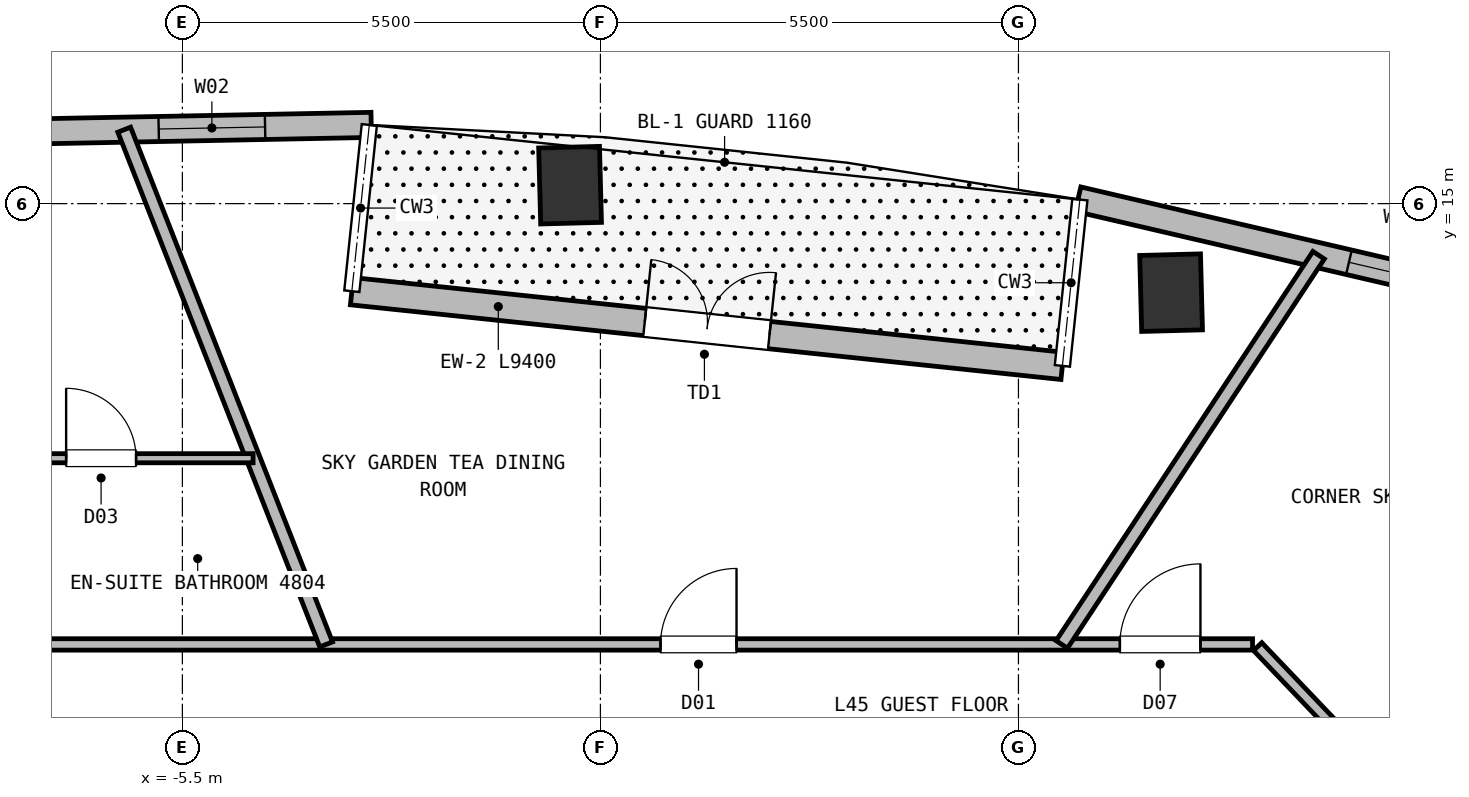
"""IFC4 building model, lengths in metres.
Left out: names, types, materials, properties, quantities, classifications, styles, units other than length and angle.
Written with IfcOpenShell. Run it as: python <this file> out.ifc"""

import sys

from ifc_helpers import new_model, si_unit, direction, frame, frame_2d, origin, origin_2d, place, context, subcontext, project, spatial, rectangle, extrude, element, fill, save


model = new_model("IFC4")
c1 = context("Model", 3, precision=1e-05, world=origin(), true_north=direction((0.0, 1.0)))
c2 = subcontext(c1, "Body", "Model", "MODEL_VIEW")
j1 = project(units=[si_unit("LENGTHUNIT", "METRE"), si_unit("PLANEANGLEUNIT", "RADIAN")], contexts=[c1])
p1 = place(None, origin())
s1 = spatial("IfcSite", under=j1, at=p1, CompositionType="ELEMENT")
p2 = place(p1, origin())
s2 = spatial("IfcBuilding", under=s1, at=p2, CompositionType="ELEMENT")
p3 = place(p2, frame((0.0, 0.0, 182.75)))
s3 = spatial("IfcBuildingStorey", under=s2, at=p3, CompositionType="ELEMENT", Elevation=182.75)
for number, where, z_axis, x_axis in (
    (1, (7.508, 13.828, 0.0), (0.0, 0.0, 1.0), (1.0, 0.026, 0.0)),
    (2, (-0.399, 15.243, 0.0), (0.0, 0.0, 1.0), (1.0, 0.026, 0.0)),
):
    element("IfcColumn", number, at=place(p3, frame(where, z_axis=z_axis, x_axis=x_axis)), inside=s3, PredefinedType="COLUMN", context=c2, shape_type="SweptSolid", body=[
        extrude(rectangle(XDim=0.8, YDim=1.0, at=origin_2d()), origin(), (0.0, 0.0, 1.0), 3.8),
    ])
p4 = place(p3, frame((-3.271, 13.848, 0.0), z_axis=(0.0, 0.0, 1.0), x_axis=(0.994520954065, -0.104537418785, 0.0)))
e3 = element("IfcWall", 3, at=p4, inside=s3, PredefinedType="SOLIDWALL", context=c2, shape_type="SweptSolid", body=[
    extrude(rectangle(XDim=9.4, YDim=0.36, at=frame_2d((4.7, 0.0))), origin(), (0.0, 0.0, 1.0), 3.55),
])
p5 = place(p4, frame((3.875, 0.0, 0.0)))
e4 = element("IfcOpeningElement", 4, at=p5, cuts=e3, PredefinedType="OPENING", context=c2, shape_type="SweptSolid", body=[
    extrude(rectangle(XDim=1.65, YDim=2.25, at=frame_2d((0.825, 1.125))), frame((0.0, 0.19, 0.0), z_axis=(0.0, -1.0, 0.0), x_axis=(1.0, 0.0, 0.0)), (0.0, 0.0, 1.0), 0.38),
])
p6 = place(p3, frame((6.284, 15.059, 0.0), z_axis=(0.0, 0.0, 1.0), x_axis=(0.973919150731, -0.226895323527, 0.0)))
e5 = element("IfcWall", 5, at=p6, inside=s3, PredefinedType="SOLIDWALL", context=c2, shape_type="SweptSolid", body=[
    extrude(rectangle(XDim=5.656, YDim=0.33, at=frame_2d((2.828, 0.0))), origin(), (0.0, 0.0, 1.0), 3.55),
])
p7 = place(p6, frame((3.66, 0.0, 0.72)))
e6 = element("IfcOpeningElement", 6, at=p7, cuts=e5, PredefinedType="OPENING", context=c2, shape_type="SweptSolid", body=[
    extrude(rectangle(XDim=1.4, YDim=1.88, at=frame_2d((0.7, 0.94))), frame((0.0, 0.175, 0.0), z_axis=(0.0, -1.0, 0.0), x_axis=(1.0, 0.0, 0.0)), (0.0, 0.0, 1.0), 0.35),
])
p8 = place(p3, frame((-8.671, 15.926, 0.0), z_axis=(0.0, 0.0, 1.0), x_axis=(0.999810548716, 0.019464497862, 0.0)))
e7 = element("IfcWall", 7, at=p8, inside=s3, PredefinedType="SOLIDWALL", context=c2, shape_type="SweptSolid", body=[
    extrude(rectangle(XDim=5.657, YDim=0.33, at=frame_2d((2.828, 0.0))), origin(), (0.0, 0.0, 1.0), 3.55),
])
p9 = place(p8, frame((2.86, 0.0, 0.72)))
e8 = element("IfcOpeningElement", 8, at=p9, cuts=e7, PredefinedType="OPENING", context=c2, shape_type="SweptSolid", body=[
    extrude(rectangle(XDim=1.4, YDim=1.88, at=frame_2d((0.7, 0.94))), frame((0.0, 0.175, 0.0), z_axis=(0.0, -1.0, 0.0), x_axis=(1.0, 0.0, 0.0)), (0.0, 0.0, 1.0), 0.35),
])
p10 = place(p3, frame((8.648, 9.171, 0.0), z_axis=(0.0, 0.0, 1.0), x_axis=(0.689960858356, -0.723846678473, 0.0)))
e9 = element("IfcWall", 9, at=p10, inside=s3, PredefinedType="PARTITIONING", context=c2, shape_type="SweptSolid", body=[
    extrude(rectangle(XDim=2.572, YDim=0.15, at=frame_2d((1.286, 0.0))), origin(), (0.0, 0.0, 1.0), 3.55),
])
p11 = place(p3, frame((-8.58, 9.2, 0.0), z_axis=(0.0, 0.0, 1.0), x_axis=(1.0, 0.0, 0.0)))
e10 = element("IfcWall", 10, at=p11, inside=s3, PredefinedType="PARTITIONING", context=c2, shape_type="SweptSolid", body=[
    extrude(rectangle(XDim=17.16, YDim=0.15, at=frame_2d((8.58, 0.0))), origin(), (0.0, 0.0, 1.0), 3.55),
])
p12 = place(p11, frame((9.371, 0.0, 0.0)))
e11 = element("IfcOpeningElement", 11, at=p12, cuts=e10, PredefinedType="OPENING", context=c2, shape_type="SweptSolid", body=[
    extrude(rectangle(XDim=1.0, YDim=2.15, at=frame_2d((0.5, 1.075))), frame((0.0, 0.085, 0.0), z_axis=(0.0, -1.0, 0.0), x_axis=(1.0, 0.0, 0.0)), (0.0, 0.0, 1.0), 0.17),
])
p13 = place(p11, frame((15.415, 0.0, 0.0)))
e12 = element("IfcOpeningElement", 12, at=p13, cuts=e10, PredefinedType="OPENING", context=c2, shape_type="SweptSolid", body=[
    extrude(rectangle(XDim=1.06, YDim=2.15, at=frame_2d((0.53, 1.075))), frame((0.0, 0.085, 0.0), z_axis=(0.0, -1.0, 0.0), x_axis=(1.0, 0.0, 0.0)), (0.0, 0.0, 1.0), 0.17),
])
p14 = place(p3, frame((12.277, 8.914, 0.0), z_axis=(0.0, 0.0, 1.0), x_axis=(-0.809184297192, -0.587554910777, 0.0)))
e13 = element("IfcWall", 13, at=p14, inside=s3, PredefinedType="PARTITIONING", context=c2, shape_type="SweptSolid", body=[
    extrude(rectangle(XDim=2.472, YDim=0.12, at=frame_2d((1.236, 0.0))), origin(), (0.0, 0.0, 1.0), 3.55),
])
p15 = place(p3, frame((6.07, 9.2, 0.0), z_axis=(0.0, 0.0, 1.0), x_axis=(0.550708603457, 0.834697570428, 0.0)))
e14 = element("IfcWall", 14, at=p15, inside=s3, PredefinedType="PARTITIONING", context=c2, shape_type="SweptSolid", body=[
    extrude(rectangle(XDim=6.135, YDim=0.18, at=frame_2d((3.068, 0.0))), origin(), (0.0, 0.0, 1.0), 3.55),
])
p16 = place(p3, frame((-3.609, 9.2, 0.0), z_axis=(0.0, 0.0, 1.0), x_axis=(-0.365139424443, 0.930952845593, 0.0)))
e15 = element("IfcWall", 15, at=p16, inside=s3, PredefinedType="PARTITIONING", context=c2, shape_type="SweptSolid", body=[
    extrude(rectangle(XDim=7.275, YDim=0.18, at=frame_2d((3.638, 0.0))), origin(), (0.0, 0.0, 1.0), 3.55),
])
p17 = place(p3, frame((-9.669, 11.65, 0.0), z_axis=(0.0, 0.0, 1.0), x_axis=(1.0, 0.0, 0.0)))
e16 = element("IfcWall", 16, at=p17, inside=s3, PredefinedType="PARTITIONING", context=c2, shape_type="SweptSolid", body=[
    extrude(rectangle(XDim=5.1, YDim=0.12, at=frame_2d((2.55, 0.0))), origin(), (0.0, 0.0, 1.0), 3.55),
])
p18 = place(p17, frame((2.64, 0.0, 0.0)))
e17 = element("IfcOpeningElement", 17, at=p18, cuts=e16, PredefinedType="OPENING", context=c2, shape_type="SweptSolid", body=[
    extrude(rectangle(XDim=0.92, YDim=2.1, at=frame_2d((0.46, 1.05))), frame((0.0, 0.07, 0.0), z_axis=(0.0, -1.0, 0.0), x_axis=(1.0, 0.0, 0.0)), (0.0, 0.0, 1.0), 0.14),
])
p19 = place(p5, origin())
e18 = element("IfcDoor", 18, at=p19, inside=s3, OperationType="DOUBLE_DOOR_SINGLE_SWING", PredefinedType="DOOR", context=c2, shape_type="SweptSolid", body=[
    extrude(rectangle(XDim=1.65, YDim=2.25, at=frame_2d((0.825, 1.125))), frame((0.0, 0.025, 0.0), z_axis=(0.0, -1.0, 0.0), x_axis=(1.0, 0.0, 0.0)), (0.0, 0.0, 1.0), 0.05),
])
fill(e4, e18)
p20 = place(p7, origin())
e19 = element("IfcWindow", 19, at=p20, inside=s3, PartitioningType="SINGLE_PANEL", PredefinedType="WINDOW", context=c2, shape_type="SweptSolid", body=[
    extrude(rectangle(XDim=1.4, YDim=1.88, at=frame_2d((0.7, 0.94))), frame((0.0, 0.03, 0.0), z_axis=(0.0, -1.0, 0.0), x_axis=(1.0, 0.0, 0.0)), (0.0, 0.0, 1.0), 0.06),
])
fill(e6, e19)
p21 = place(p9, origin())
e20 = element("IfcWindow", 20, at=p21, inside=s3, PartitioningType="SINGLE_PANEL", PredefinedType="WINDOW", context=c2, shape_type="SweptSolid", body=[
    extrude(rectangle(XDim=1.4, YDim=1.88, at=frame_2d((0.7, 0.94))), frame((0.0, 0.03, 0.0), z_axis=(0.0, -1.0, 0.0), x_axis=(1.0, 0.0, 0.0)), (0.0, 0.0, 1.0), 0.06),
])
fill(e8, e20)
p22 = place(p18, origin())
e21 = element("IfcDoor", 21, at=p22, inside=s3, OperationType="SINGLE_SWING_LEFT", PredefinedType="DOOR", context=c2, shape_type="SweptSolid", body=[
    extrude(rectangle(XDim=0.92, YDim=2.1, at=frame_2d((0.46, 1.05))), frame((0.0, 0.025, 0.0), z_axis=(0.0, -1.0, 0.0), x_axis=(1.0, 0.0, 0.0)), (0.0, 0.0, 1.0), 0.05),
])
fill(e17, e21)
p23 = place(p12, origin())
e22 = element("IfcDoor", 22, at=p23, inside=s3, OperationType="SINGLE_SWING_RIGHT", PredefinedType="DOOR", context=c2, shape_type="SweptSolid", body=[
    extrude(rectangle(XDim=1.0, YDim=2.15, at=frame_2d((0.5, 1.075))), frame((0.0, 0.025, 0.0), z_axis=(0.0, -1.0, 0.0), x_axis=(1.0, 0.0, 0.0)), (0.0, 0.0, 1.0), 0.05),
])
fill(e11, e22)
p24 = place(p13, origin())
e23 = element("IfcDoor", 23, at=p24, inside=s3, OperationType="SINGLE_SWING_RIGHT", PredefinedType="DOOR", context=c2, shape_type="SweptSolid", body=[
    extrude(rectangle(XDim=1.06, YDim=2.15, at=frame_2d((0.53, 1.075))), frame((0.0, 0.025, 0.0), z_axis=(0.0, -1.0, 0.0), x_axis=(1.0, 0.0, 0.0)), (0.0, 0.0, 1.0), 0.05),
])
fill(e12, e23)
save(model, sys.argv[1])
